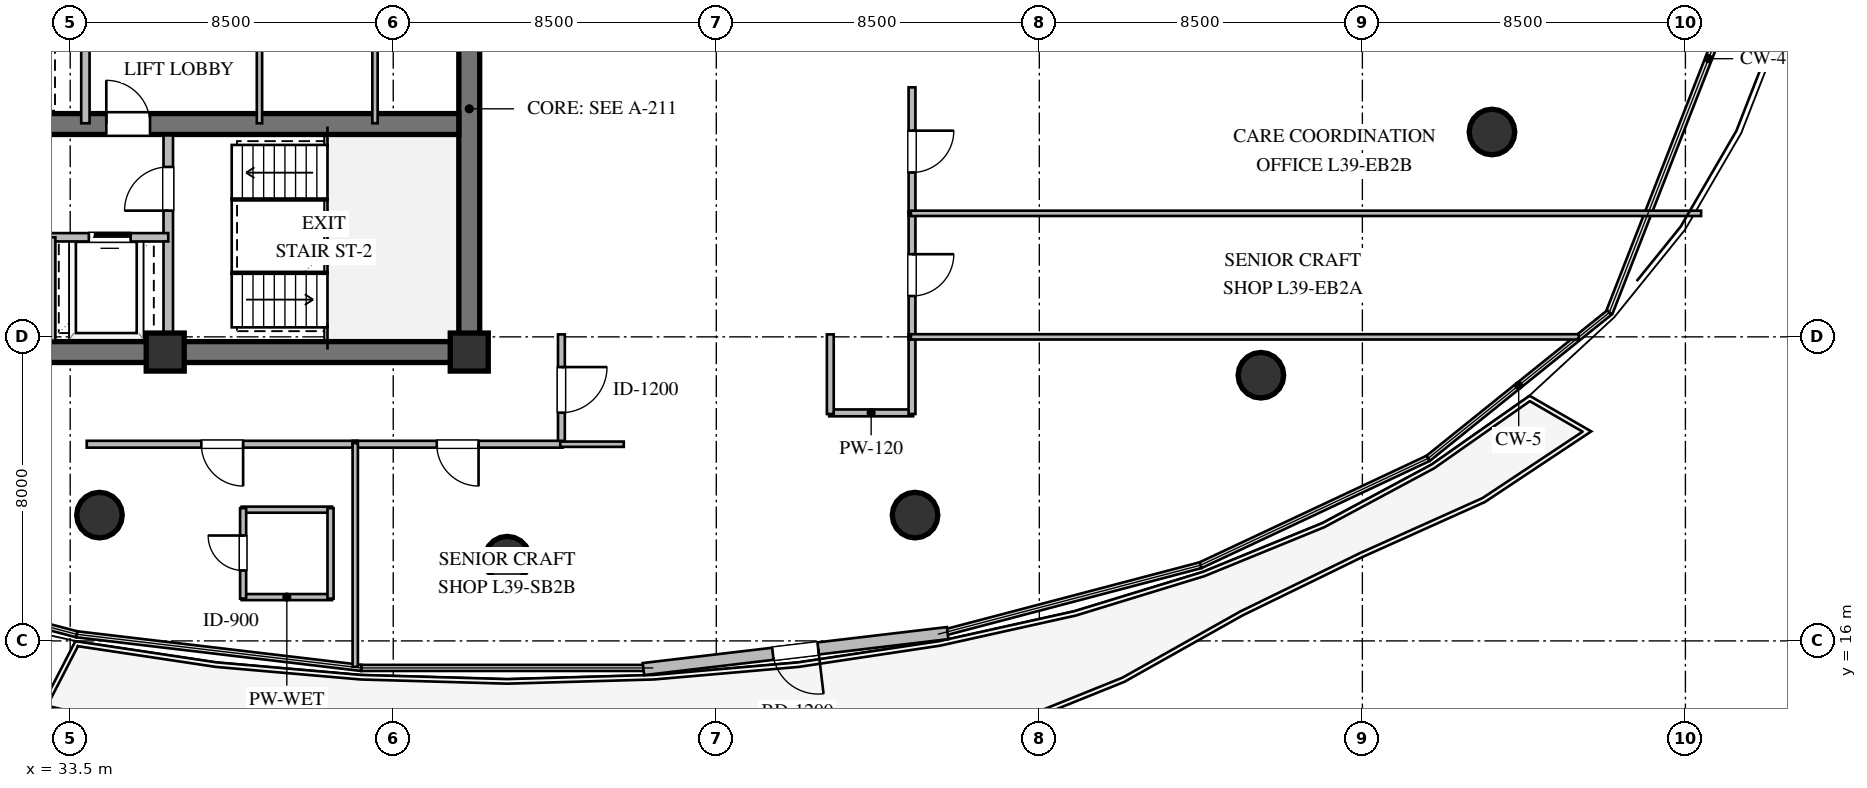
"""IFC4 building model, lengths in metres.
Left out: names, types, materials, properties, quantities, classifications, styles, units other than length and angle.
Written with IfcOpenShell. Run it as: python <this file> out.ifc"""

import sys

from ifc_helpers import new_model, si_unit, direction, frame, frame_2d, origin, origin_2d, place, context, subcontext, project, spatial, rectangle, circle, extrude, element, fill, save


model = new_model("IFC4")
c1 = context("Model", 3, precision=1e-05, world=origin(), true_north=direction((0.0, 1.0)))
c2 = subcontext(c1, "Body", "Model", "MODEL_VIEW")
j1 = project(units=[si_unit("LENGTHUNIT", "METRE"), si_unit("PLANEANGLEUNIT", "RADIAN")], contexts=[c1])
p1 = place(None, origin())
s1 = spatial("IfcSite", under=j1, at=p1, CompositionType="ELEMENT")
p2 = place(p1, origin())
s2 = spatial("IfcBuilding", under=s1, at=p2, CompositionType="ELEMENT")
p3 = place(p2, frame((0.0, 0.0, 149.4)))
s3 = spatial("IfcBuildingStorey", under=s2, at=p3, CompositionType="ELEMENT", Elevation=149.4)
p4 = place(p3, frame((21.725, 23.6, 0.0), z_axis=(0.0, 0.0, 1.0), x_axis=(1.0, 0.0, 0.0)))
e1 = element("IfcWall", 1, at=p4, inside=s3, PredefinedType="SHEAR", context=c2, shape_type="SweptSolid", body=[
    extrude(rectangle(XDim=22.55, YDim=0.55, at=frame_2d((11.275, 0.0))), origin(), (0.0, 0.0, 1.0), 3.36),
])
p5 = place(p3, frame((44.0, 23.875, 0.0), z_axis=(0.0, 0.0, 1.0), x_axis=(0.0, 1.0, 0.0)))
e2 = element("IfcWall", 2, at=p5, inside=s3, PredefinedType="SHEAR", context=c2, shape_type="SweptSolid", body=[
    extrude(rectangle(XDim=12.25, YDim=0.55, at=frame_2d((6.125, 0.0))), origin(), (0.0, 0.0, 1.0), 3.36),
])
p6 = place(p5, frame((8.725, 0.0, 0.0)))
e3 = element("IfcOpeningElement", 3, at=p6, cuts=e2, PredefinedType="OPENING", context=c2, shape_type="SweptSolid", body=[
    extrude(rectangle(XDim=1.5, YDim=2.15, at=frame_2d((0.75, 1.075))), frame((0.0, 0.285, 0.0), z_axis=(0.0, -1.0, 0.0), x_axis=(1.0, 0.0, 0.0)), (0.0, 0.0, 1.0), 0.57),
])
p7 = place(p3, frame((22.275, 29.6, 0.0), z_axis=(0.0, 0.0, 1.0), x_axis=(1.0, 0.0, 0.0)))
e4 = element("IfcWall", 4, at=p7, inside=s3, PredefinedType="SHEAR", context=c2, shape_type="SweptSolid", body=[
    extrude(rectangle(XDim=21.45, YDim=0.55, at=frame_2d((10.725, 0.0))), origin(), (0.0, 0.0, 1.0), 3.36),
])
p8 = place(p7, frame((12.175, 0.0, 0.0)))
e5 = element("IfcOpeningElement", 5, at=p8, cuts=e4, PredefinedType="OPENING", context=c2, shape_type="SweptSolid", body=[
    extrude(rectangle(XDim=1.15, YDim=2.1, at=frame_2d((0.575, 1.05))), frame((0.0, 0.285, 0.0), z_axis=(0.0, -1.0, 0.0), x_axis=(1.0, 0.0, 0.0)), (0.0, 0.0, 1.0), 0.57),
])
for number, where, z_axis, x_axis in (
    (6, (36.0, 23.6, 0.0), (0.0, 0.0, 1.0), (1.0, 0.0, 0.0)),
    (7, (44.0, 23.6, 0.0), (0.0, 0.0, 1.0), (1.0, 0.0, 0.0)),
):
    element("IfcColumn", number, at=place(p3, frame(where, z_axis=z_axis, x_axis=x_axis)), inside=s3, PredefinedType="COLUMN", context=c2, shape_type="SweptSolid", body=[
        extrude(rectangle(XDim=1.0, YDim=1.0, at=origin_2d()), origin(), (0.0, 0.0, 1.0), 3.6),
    ])
for number, where, z_axis, x_axis in (
    (8, (34.27, 19.31, 0.0), (0.0, 0.0, 1.0), (1.0, 0.0, 0.0)),
    (9, (45.0, 18.15, 0.0), (0.0, 0.0, 1.0), (1.0, 0.0, 0.0)),
    (10, (55.73, 19.31, 0.0), (0.0, 0.0, 1.0), (1.0, 0.0, 0.0)),
    (11, (64.83, 22.99, 0.0), (0.0, 0.0, 1.0), (1.0, 0.0, 0.0)),
    (12, (70.91, 29.39, 0.0), (0.0, 0.0, 1.0), (1.0, 0.0, 0.0)),
):
    element("IfcColumn", number, at=place(p3, frame(where, z_axis=z_axis, x_axis=x_axis)), inside=s3, PredefinedType="COLUMN", context=c2, shape_type="SweptSolid", body=[
        extrude(circle(Radius=0.6, at=origin_2d()), origin(), (0.0, 0.0, 1.0), 3.6),
    ])
p9 = place(p3, frame((56.587, 16.205, 0.0), z_axis=(0.0, 0.0, 1.0), x_axis=(-0.993072847957, -0.117500292131, 0.0)))
e13 = element("IfcWall", 13, at=p9, inside=s3, PredefinedType="STANDARD", context=c2, shape_type="SweptSolid", body=[
    extrude(rectangle(XDim=8.06, YDim=0.32, at=frame_2d((4.03, 0.0))), origin(), (0.0, 0.0, 1.0), 3.36),
])
p10 = place(p9, frame((3.43, 0.0, 0.0)))
e14 = element("IfcOpeningElement", 14, at=p10, cuts=e13, PredefinedType="OPENING", context=c2, shape_type="SweptSolid", body=[
    extrude(rectangle(XDim=1.2, YDim=2.15, at=frame_2d((0.6, 1.075))), frame((0.0, 0.17, 0.0), z_axis=(0.0, -1.0, 0.0), x_axis=(1.0, 0.0, 0.0)), (0.0, 0.0, 1.0), 0.34),
])
p11 = place(p3, frame((36.08, 23.9, 0.0), z_axis=(0.0, 0.0, 1.0), x_axis=(0.0, 1.0, 0.0)))
e15 = element("IfcWall", 15, at=p11, inside=s3, PredefinedType="SOLIDWALL", context=c2, shape_type="SweptSolid", body=[
    extrude(rectangle(XDim=5.4, YDim=0.25, at=frame_2d((2.7, 0.0))), origin(), (0.0, 0.0, 1.0), 3.36),
])
p12 = place(p11, frame((3.421, 0.0, 0.0)))
e16 = element("IfcOpeningElement", 16, at=p12, cuts=e15, PredefinedType="OPENING", context=c2, shape_type="SweptSolid", body=[
    extrude(rectangle(XDim=1.15, YDim=2.1, at=frame_2d((0.575, 1.05))), frame((0.0, 0.135, 0.0), z_axis=(0.0, -1.0, 0.0), x_axis=(1.0, 0.0, 0.0)), (0.0, 0.0, 1.0), 0.27),
])
p13 = place(p3, frame((29.92, 26.62, 0.0), z_axis=(0.0, 0.0, 1.0), x_axis=(1.0, 0.0, 0.0)))
e17 = element("IfcWall", 17, at=p13, inside=s3, PredefinedType="SOLIDWALL", context=c2, shape_type="SweptSolid", body=[
    extrude(rectangle(XDim=6.16, YDim=0.22, at=frame_2d((3.08, 0.0))), origin(), (0.0, 0.0, 1.0), 3.36),
])
p14 = place(p13, frame((0.99, 0.0, 0.0)))
e18 = element("IfcOpeningElement", 18, at=p14, cuts=e17, PredefinedType="OPENING", context=c2, shape_type="SweptSolid", body=[
    extrude(rectangle(XDim=1.1, YDim=2.1, at=frame_2d((0.55, 1.05))), frame((0.0, 0.12, 0.0), z_axis=(0.0, -1.0, 0.0), x_axis=(1.0, 0.0, 0.0)), (0.0, 0.0, 1.0), 0.24),
])
p15 = place(p13, frame((4.07, 0.0, 0.0)))
e19 = element("IfcOpeningElement", 19, at=p15, cuts=e17, PredefinedType="OPENING", context=c2, shape_type="SweptSolid", body=[
    extrude(rectangle(XDim=1.1, YDim=2.1, at=frame_2d((0.55, 1.05))), frame((0.0, 0.12, 0.0), z_axis=(0.0, -1.0, 0.0), x_axis=(1.0, 0.0, 0.0)), (0.0, 0.0, 1.0), 0.24),
])
p16 = place(p3, frame((33.0, 23.9, 0.0), z_axis=(0.0, 0.0, 1.0), x_axis=(0.0, 1.0, 0.0)))
e20 = element("IfcWall", 20, at=p16, inside=s3, PredefinedType="SOLIDWALL", context=c2, shape_type="SweptSolid", body=[
    extrude(rectangle(XDim=2.72, YDim=0.22, at=frame_2d((1.36, 0.0))), origin(), (0.0, 0.0, 1.0), 3.36),
])
p17 = place(p3, frame((33.9, 29.62, 0.0), z_axis=(0.0, 0.0, 1.0), x_axis=(0.0, 1.0, 0.0)))
e21 = element("IfcWall", 21, at=p17, inside=s3, PredefinedType="SOLIDWALL", context=c2, shape_type="SweptSolid", body=[
    extrude(rectangle(XDim=2.36, YDim=0.22, at=frame_2d((1.18, 0.0))), origin(), (0.0, 0.0, 1.0), 3.36),
])
for number, where, z_axis, x_axis in (
    (22, (38.48, 29.62, 0.0), (0.0, 0.0, 1.0), (0.0, 1.0, 0.0)),
    (23, (41.52, 29.62, 0.0), (0.0, 0.0, 1.0), (0.0, 1.0, 0.0)),
):
    element("IfcWall", number, at=place(p3, frame(where, z_axis=z_axis, x_axis=x_axis)), inside=s3, PredefinedType="PARTITIONING", context=c2, shape_type="SweptSolid", body=[
        extrude(rectangle(XDim=2.36, YDim=0.14, at=frame_2d((1.18, 0.0))), origin(), (0.0, 0.0, 1.0), 3.36),
    ])
p18 = place(p3, frame((38.01, 17.153, 0.0), z_axis=(0.0, 0.0, 1.0), x_axis=(1.0, 0.0, 0.0)))
e24 = element("IfcWall", 24, at=p18, inside=s3, PredefinedType="PLUMBINGWALL", context=c2, shape_type="SweptSolid", body=[
    extrude(rectangle(XDim=2.38, YDim=0.16, at=frame_2d((1.19, 0.0))), origin(), (0.0, 0.0, 1.0), 3.36),
])
p19 = place(p3, frame((38.01, 19.453, 0.0), z_axis=(0.0, 0.0, 1.0), x_axis=(1.0, 0.0, 0.0)))
e25 = element("IfcWall", 25, at=p19, inside=s3, PredefinedType="PLUMBINGWALL", context=c2, shape_type="SweptSolid", body=[
    extrude(rectangle(XDim=2.38, YDim=0.16, at=frame_2d((1.19, 0.0))), origin(), (0.0, 0.0, 1.0), 2.657),
])
p20 = place(p3, frame((38.05, 17.113, 0.0), z_axis=(0.0, 0.0, 1.0), x_axis=(0.0, 1.0, 0.0)))
e26 = element("IfcWall", 26, at=p20, inside=s3, PredefinedType="PLUMBINGWALL", context=c2, shape_type="SweptSolid", body=[
    extrude(rectangle(XDim=2.38, YDim=0.16, at=frame_2d((1.19, 0.0))), origin(), (0.0, 0.0, 1.0), 3.36),
])
p21 = place(p20, frame((0.74, 0.0, 0.0)))
e27 = element("IfcOpeningElement", 27, at=p21, cuts=e26, PredefinedType="OPENING", context=c2, shape_type="SweptSolid", body=[
    extrude(rectangle(XDim=0.92, YDim=2.1, at=frame_2d((0.46, 1.05))), frame((0.0, 0.09, 0.0), z_axis=(0.0, -1.0, 0.0), x_axis=(1.0, 0.0, 0.0)), (0.0, 0.0, 1.0), 0.18),
])
p22 = place(p3, frame((40.35, 17.113, 0.0), z_axis=(0.0, 0.0, 1.0), x_axis=(0.0, 1.0, 0.0)))
e28 = element("IfcWall", 28, at=p22, inside=s3, PredefinedType="PLUMBINGWALL", context=c2, shape_type="SweptSolid", body=[
    extrude(rectangle(XDim=2.38, YDim=0.16, at=frame_2d((1.19, 0.0))), origin(), (0.0, 0.0, 1.0), 3.36),
])
p23 = place(p3, frame((46.425, 24.065, 0.0), z_axis=(0.0, 0.0, 1.0), x_axis=(0.0, -1.0, 0.0)))
e29 = element("IfcWall", 29, at=p23, inside=s3, PredefinedType="PARTITIONING", context=c2, shape_type="SweptSolid", body=[
    extrude(rectangle(XDim=2.92, YDim=0.18, at=frame_2d((1.46, 0.0))), origin(), (0.0, 0.0, 1.0), 3.36),
])
p24 = place(p23, frame((0.86, 0.0, 0.0)))
e30 = element("IfcOpeningElement", 30, at=p24, cuts=e29, PredefinedType="OPENING", context=c2, shape_type="SweptSolid", body=[
    extrude(rectangle(XDim=1.2, YDim=2.15, at=frame_2d((0.6, 1.075))), frame((0.0, 0.1, 0.0), z_axis=(0.0, -1.0, 0.0), x_axis=(1.0, 0.0, 0.0)), (0.0, 0.0, 1.0), 0.2),
])
p25 = place(p3, frame((55.68, 22.0, 0.0), z_axis=(0.0, 0.0, 1.0), x_axis=(-1.0, 0.0, 0.0)))
e31 = element("IfcWall", 31, at=p25, inside=s3, PredefinedType="PARTITIONING", context=c2, shape_type="SweptSolid", body=[
    extrude(rectangle(XDim=2.21, YDim=0.18, at=frame_2d((1.105, 0.0))), origin(), (0.0, 0.0, 1.0), 3.36),
])
for number, where, z_axis, x_axis in (
    (32, (55.65, 24.065, 0.0), (0.0, 0.0, 1.0), (0.0, -1.0, 0.0)),
    (33, (53.5, 21.97, 0.0), (0.0, 0.0, 1.0), (0.0, 1.0, 0.0)),
):
    element("IfcWall", number, at=place(p3, frame(where, z_axis=z_axis, x_axis=x_axis)), inside=s3, PredefinedType="PARTITIONING", context=c2, shape_type="SweptSolid", body=[
        extrude(rectangle(XDim=2.095, YDim=0.18, at=frame_2d((1.047, 0.0))), origin(), (0.0, 0.0, 1.0), 3.36),
    ])
p26 = place(p3, frame((55.65, 27.315, 0.0), z_axis=(0.0, 0.0, 1.0), x_axis=(0.0, -1.0, 0.0)))
e34 = element("IfcWall", 34, at=p26, inside=s3, PredefinedType="PARTITIONING", context=c2, shape_type="SweptSolid", body=[
    extrude(rectangle(XDim=3.38, YDim=0.18, at=frame_2d((1.69, 0.0))), origin(), (0.0, 0.0, 1.0), 3.36),
])
p27 = place(p26, frame((1.14, 0.0, 0.0)))
e35 = element("IfcOpeningElement", 35, at=p27, cuts=e34, PredefinedType="OPENING", context=c2, shape_type="SweptSolid", body=[
    extrude(rectangle(XDim=1.1, YDim=2.1, at=frame_2d((0.55, 1.05))), frame((0.0, 0.1, 0.0), z_axis=(0.0, -1.0, 0.0), x_axis=(1.0, 0.0, 0.0)), (0.0, 0.0, 1.0), 0.2),
])
p28 = place(p3, frame((55.65, 30.565, 0.0), z_axis=(0.0, 0.0, 1.0), x_axis=(0.0, -1.0, 0.0)))
e36 = element("IfcWall", 36, at=p28, inside=s3, PredefinedType="PARTITIONING", context=c2, shape_type="SweptSolid", body=[
    extrude(rectangle(XDim=3.38, YDim=0.18, at=frame_2d((1.69, 0.0))), origin(), (0.0, 0.0, 1.0), 3.36),
])
p29 = place(p28, frame((1.14, 0.0, 0.0)))
e37 = element("IfcOpeningElement", 37, at=p29, cuts=e36, PredefinedType="OPENING", context=c2, shape_type="SweptSolid", body=[
    extrude(rectangle(XDim=1.1, YDim=2.1, at=frame_2d((0.55, 1.05))), frame((0.0, 0.1, 0.0), z_axis=(0.0, -1.0, 0.0), x_axis=(1.0, 0.0, 0.0)), (0.0, 0.0, 1.0), 0.2),
])
p30 = place(p3, frame((41.065, 21.175, 0.0), z_axis=(0.0, 0.0, 1.0), x_axis=(-1.0, 0.0, 0.0)))
e38 = element("IfcWall", 38, at=p30, inside=s3, PredefinedType="PARTITIONING", context=c2, shape_type="SweptSolid", body=[
    extrude(rectangle(XDim=7.13, YDim=0.18, at=frame_2d((3.565, 0.0))), origin(), (0.0, 0.0, 1.0), 2.996),
])
p31 = place(p30, frame((3.015, 0.0, 0.0)))
e39 = element("IfcOpeningElement", 39, at=p31, cuts=e38, PredefinedType="OPENING", context=c2, shape_type="SweptSolid", body=[
    extrude(rectangle(XDim=1.1, YDim=2.1, at=frame_2d((0.55, 1.05))), frame((0.0, 0.1, 0.0), z_axis=(0.0, -1.0, 0.0), x_axis=(1.0, 0.0, 0.0)), (0.0, 0.0, 1.0), 0.2),
])
p32 = place(p3, frame((46.455, 21.175, 0.0), z_axis=(0.0, 0.0, 1.0), x_axis=(-1.0, 0.0, 0.0)))
e40 = element("IfcWall", 40, at=p32, inside=s3, PredefinedType="PARTITIONING", context=c2, shape_type="SweptSolid", body=[
    extrude(rectangle(XDim=5.52, YDim=0.18, at=frame_2d((2.76, 0.0))), origin(), (0.0, 0.0, 1.0), 2.996),
])
p33 = place(p32, frame((2.21, 0.0, 0.0)))
e41 = element("IfcOpeningElement", 41, at=p33, cuts=e40, PredefinedType="OPENING", context=c2, shape_type="SweptSolid", body=[
    extrude(rectangle(XDim=1.1, YDim=2.1, at=frame_2d((0.55, 1.05))), frame((0.0, 0.1, 0.0), z_axis=(0.0, -1.0, 0.0), x_axis=(1.0, 0.0, 0.0)), (0.0, 0.0, 1.0), 0.2),
])
p34 = place(p3, frame((55.62, 24.0, 0.0), z_axis=(0.0, 0.0, 1.0), x_axis=(1.0, 0.0, 0.0)))
e42 = element("IfcWall", 42, at=p34, inside=s3, PredefinedType="PARTITIONING", context=c2, shape_type="SweptSolid", body=[
    extrude(rectangle(XDim=17.573, YDim=0.14, at=frame_2d((8.787, 0.0))), origin(), (0.0, 0.0, 1.0), 3.36),
])
p35 = place(p3, frame((48.065, 21.175, 0.0), z_axis=(0.0, 0.0, 1.0), x_axis=(-1.0, 0.0, 0.0)))
e43 = element("IfcWall", 43, at=p35, inside=s3, PredefinedType="PARTITIONING", context=c2, shape_type="SweptSolid", body=[
    extrude(rectangle(XDim=1.67, YDim=0.14, at=frame_2d((0.835, 0.0))), origin(), (0.0, 0.0, 1.0), 2.996),
])
p36 = place(p3, frame((55.62, 27.25, 0.0), z_axis=(0.0, 0.0, 1.0), x_axis=(1.0, 0.0, 0.0)))
e44 = element("IfcWall", 44, at=p36, inside=s3, PredefinedType="PARTITIONING", context=c2, shape_type="SweptSolid", body=[
    extrude(rectangle(XDim=20.793, YDim=0.14, at=frame_2d((10.396, 0.0))), origin(), (0.0, 0.0, 1.0), 2.89),
])
p37 = place(p3, frame((41.0, 21.205, 0.0), z_axis=(0.0, 0.0, 1.0), x_axis=(0.0, -1.0, 0.0)))
e45 = element("IfcWall", 45, at=p37, inside=s3, PredefinedType="PARTITIONING", context=c2, shape_type="SweptSolid", body=[
    extrude(rectangle(XDim=5.887, YDim=0.14, at=frame_2d((2.944, 0.0))), origin(), (0.0, 0.0, 1.0), 3.36),
])
p38 = place(p10, origin())
e46 = element("IfcDoor", 46, at=p38, inside=s3, OperationType="SINGLE_SWING_LEFT", PredefinedType="DOOR", context=c2, shape_type="SweptSolid", body=[
    extrude(rectangle(XDim=1.2, YDim=2.15, at=frame_2d((0.6, 1.075))), frame((0.0, 0.025, 0.0), z_axis=(0.0, -1.0, 0.0), x_axis=(1.0, 0.0, 0.0)), (0.0, 0.0, 1.0), 0.05),
])
fill(e14, e46)
p39 = place(p12, origin())
e47 = element("IfcDoor", 47, at=p39, inside=s3, OperationType="SINGLE_SWING_LEFT", PredefinedType="DOOR", context=c2, shape_type="SweptSolid", body=[
    extrude(rectangle(XDim=1.15, YDim=2.1, at=frame_2d((0.575, 1.05))), frame((0.0, 0.025, 0.0), z_axis=(0.0, -1.0, 0.0), x_axis=(1.0, 0.0, 0.0)), (0.0, 0.0, 1.0), 0.05),
])
fill(e16, e47)
p40 = place(p15, origin())
e48 = element("IfcDoor", 48, at=p40, inside=s3, OperationType="SLIDING_TO_RIGHT", PredefinedType="DOOR", context=c2, shape_type="SweptSolid", body=[
    extrude(rectangle(XDim=1.1, YDim=2.1, at=frame_2d((0.55, 1.05))), frame((0.0, 0.025, 0.0), z_axis=(0.0, -1.0, 0.0), x_axis=(1.0, 0.0, 0.0)), (0.0, 0.0, 1.0), 0.05),
])
fill(e19, e48)
p41 = place(p8, origin())
e49 = element("IfcDoor", 49, at=p41, inside=s3, OperationType="SINGLE_SWING_LEFT", PredefinedType="DOOR", context=c2, shape_type="SweptSolid", body=[
    extrude(rectangle(XDim=1.15, YDim=2.1, at=frame_2d((0.575, 1.05))), frame((0.0, 0.025, 0.0), z_axis=(0.0, -1.0, 0.0), x_axis=(1.0, 0.0, 0.0)), (0.0, 0.0, 1.0), 0.05),
])
fill(e5, e49)
p42 = place(p21, origin())
e50 = element("IfcDoor", 50, at=p42, inside=s3, OperationType="SINGLE_SWING_RIGHT", PredefinedType="DOOR", context=c2, shape_type="SweptSolid", body=[
    extrude(rectangle(XDim=0.92, YDim=2.1, at=frame_2d((0.46, 1.05))), frame((0.0, 0.025, 0.0), z_axis=(0.0, -1.0, 0.0), x_axis=(1.0, 0.0, 0.0)), (0.0, 0.0, 1.0), 0.05),
])
fill(e27, e50)
p43 = place(p24, origin())
e51 = element("IfcDoor", 51, at=p43, inside=s3, OperationType="SINGLE_SWING_LEFT", PredefinedType="DOOR", context=c2, shape_type="SweptSolid", body=[
    extrude(rectangle(XDim=1.2, YDim=2.15, at=frame_2d((0.6, 1.075))), frame((0.0, 0.025, 0.0), z_axis=(0.0, -1.0, 0.0), x_axis=(1.0, 0.0, 0.0)), (0.0, 0.0, 1.0), 0.05),
])
fill(e30, e51)
p44 = place(p27, origin())
e52 = element("IfcDoor", 52, at=p44, inside=s3, OperationType="SINGLE_SWING_LEFT", PredefinedType="DOOR", context=c2, shape_type="SweptSolid", body=[
    extrude(rectangle(XDim=1.1, YDim=2.1, at=frame_2d((0.55, 1.05))), frame((0.0, 0.025, 0.0), z_axis=(0.0, -1.0, 0.0), x_axis=(1.0, 0.0, 0.0)), (0.0, 0.0, 1.0), 0.05),
])
fill(e35, e52)
p45 = place(p29, origin())
e53 = element("IfcDoor", 53, at=p45, inside=s3, OperationType="SINGLE_SWING_LEFT", PredefinedType="DOOR", context=c2, shape_type="SweptSolid", body=[
    extrude(rectangle(XDim=1.1, YDim=2.1, at=frame_2d((0.55, 1.05))), frame((0.0, 0.025, 0.0), z_axis=(0.0, -1.0, 0.0), x_axis=(1.0, 0.0, 0.0)), (0.0, 0.0, 1.0), 0.05),
])
fill(e37, e53)
p46 = place(p31, origin())
e54 = element("IfcDoor", 54, at=p46, inside=s3, OperationType="SINGLE_SWING_LEFT", PredefinedType="DOOR", context=c2, shape_type="SweptSolid", body=[
    extrude(rectangle(XDim=1.1, YDim=2.1, at=frame_2d((0.55, 1.05))), frame((0.0, 0.025, 0.0), z_axis=(0.0, -1.0, 0.0), x_axis=(1.0, 0.0, 0.0)), (0.0, 0.0, 1.0), 0.05),
])
fill(e39, e54)
p47 = place(p33, origin())
e55 = element("IfcDoor", 55, at=p47, inside=s3, OperationType="SINGLE_SWING_LEFT", PredefinedType="DOOR", context=c2, shape_type="SweptSolid", body=[
    extrude(rectangle(XDim=1.1, YDim=2.1, at=frame_2d((0.55, 1.05))), frame((0.0, 0.025, 0.0), z_axis=(0.0, -1.0, 0.0), x_axis=(1.0, 0.0, 0.0)), (0.0, 0.0, 1.0), 0.05),
])
fill(e41, e55)
save(model, sys.argv[1])
